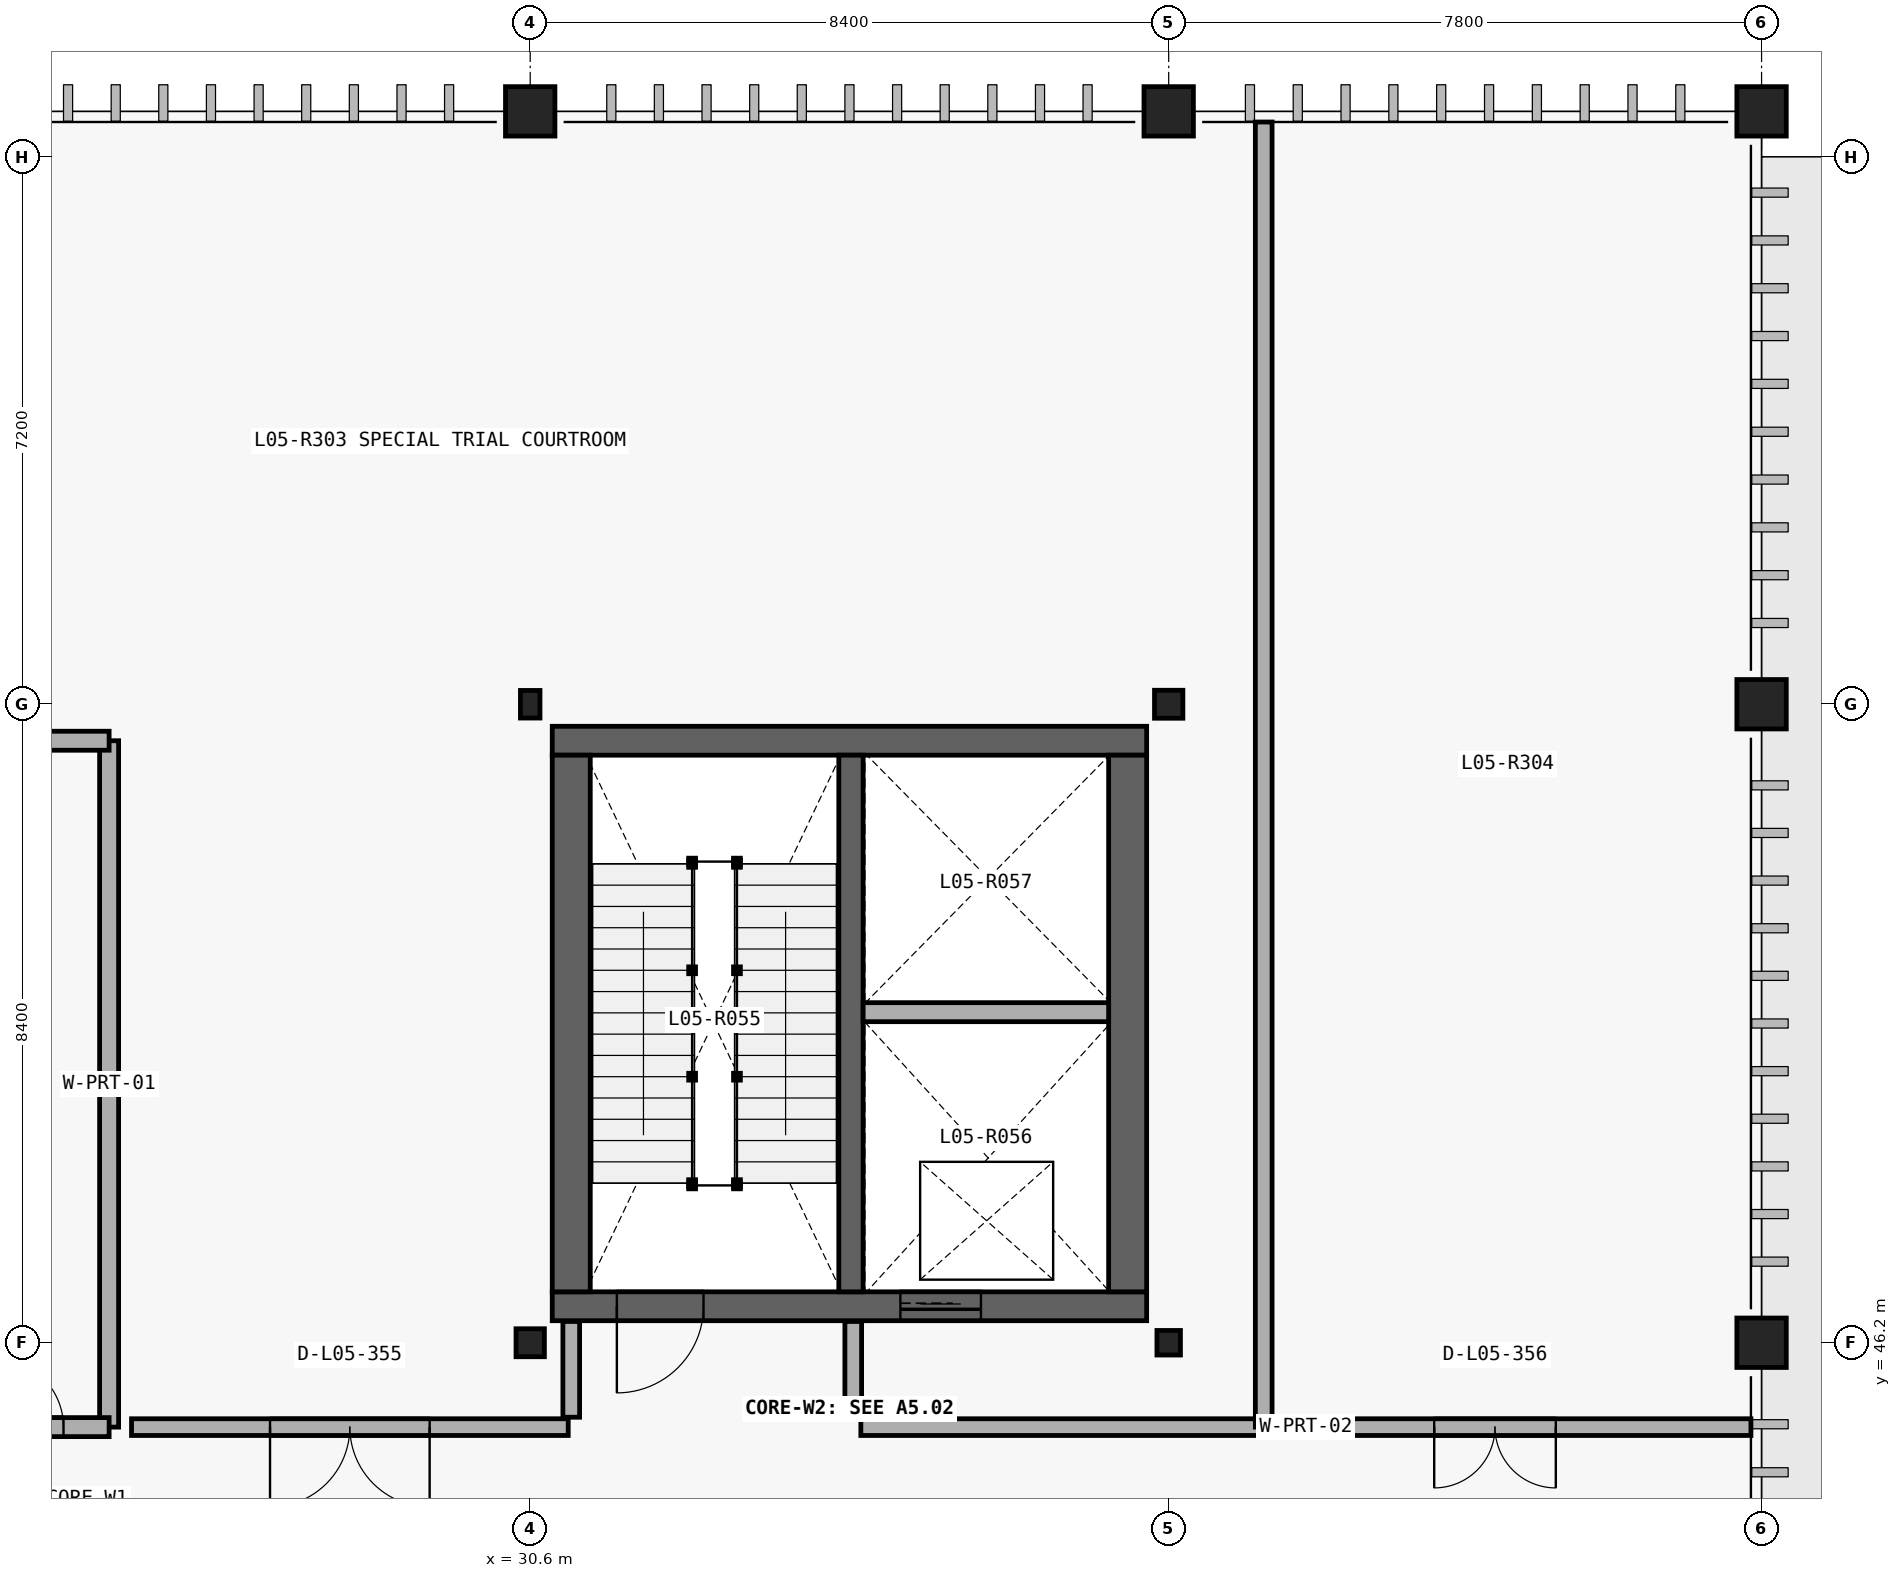
"""IFC4 building model, lengths in metres.
Left out: names, types, materials, properties, quantities, classifications, styles, units other than length and angle.
Written with IfcOpenShell. Run it as: python <this file> out.ifc"""

import sys

from ifc_helpers import new_model, si_unit, direction, frame, frame_2d, origin_with_axes, origin_2d_with_axis, place, context, subcontext, project, spatial, rectangle, circle, i_section, extrude, element, fill, save


model = new_model("IFC4")
c1 = context("Model", 3, precision=1e-05, world=origin_with_axes(), true_north=direction((0.0, 1.0)))
c2 = subcontext(c1, "Body", "Model", "MODEL_VIEW")
j1 = project(units=[si_unit("LENGTHUNIT", "METRE"), si_unit("PLANEANGLEUNIT", "RADIAN")], contexts=[c1])
p1 = place(None, origin_with_axes())
s1 = spatial("IfcSite", under=j1, at=p1, CompositionType="ELEMENT")
p2 = place(p1, origin_with_axes())
s2 = spatial("IfcBuilding", under=s1, at=p2, CompositionType="ELEMENT")
p3 = place(p2, frame((0.0, 0.0, 24.9), z_axis=(0.0, 0.0, 1.0), x_axis=(1.0, 0.0, 0.0)))
s3 = spatial("IfcBuildingStorey", under=s2, at=p3, CompositionType="ELEMENT", Elevation=24.9)
p4 = place(None, frame((25.06, 45.09, 24.9), z_axis=(0.0, 0.0, 1.0), x_axis=(0.0, 1.0, 0.0)))
e1 = element("IfcWall", 1, at=p4, inside=s3, PredefinedType="PARTITIONING", context=c2, shape_type="SweptSolid", body=[
    extrude(rectangle(XDim=9.03, YDim=0.25, at=frame_2d((4.515, 0.0), x_axis=(1.0, 0.0))), origin_with_axes(), (0.0, 0.0, 1.0), 4.44),
])
p5 = place(None, frame((21.7, 54.12, 24.9), z_axis=(0.0, 0.0, 1.0), x_axis=(1.0, 0.0, 0.0)))
e2 = element("IfcWall", 2, at=p5, inside=s3, PredefinedType="PARTITIONING", context=c2, shape_type="SweptSolid", body=[
    extrude(rectangle(XDim=3.36, YDim=0.25, at=frame_2d((1.68, 0.0), x_axis=(1.0, 0.0))), origin_with_axes(), (0.0, 0.0, 1.0), 4.44),
])
p6 = place(None, frame((21.7, 45.09, 24.9), z_axis=(0.0, 0.0, 1.0), x_axis=(1.0, 0.0, 0.0)))
e3 = element("IfcWall", 3, at=p6, inside=s3, PredefinedType="PARTITIONING", context=c2, shape_type="SweptSolid", body=[
    extrude(rectangle(XDim=3.36, YDim=0.25, at=frame_2d((1.68, 0.0), x_axis=(1.0, 0.0))), origin_with_axes(), (0.0, 0.0, 1.0), 4.44),
])
p7 = place(None, frame((24.005, 45.09, 24.9), z_axis=(0.0, 0.0, 1.0), x_axis=(1.0, 0.0, 0.0)))
e4 = element("IfcOpeningElement", 4, at=p7, cuts=e3, PredefinedType="OPENING", context=c2, shape_type="SweptSolid", body=[
    extrude(rectangle(XDim=0.91, YDim=2.12, at=frame_2d((0.0, 1.06), x_axis=(1.0, 0.0))), frame((0.0, 0.135, 0.0), z_axis=(0.0, -1.0, 0.0), x_axis=(1.0, 0.0, 0.0)), (0.0, 0.0, 1.0), 0.27),
])
p8 = place(None, frame((30.89, 46.68, 24.9), z_axis=(0.0, 0.0, 1.0), x_axis=(1.0, 0.0, 0.0)))
e5 = element("IfcWall", 5, at=p8, inside=s3, PredefinedType="SHEAR", context=c2, shape_type="SweptSolid", body=[
    extrude(rectangle(XDim=7.82, YDim=0.38, at=frame_2d((3.91, 0.0), x_axis=(1.0, 0.0))), origin_with_axes(), (0.0, 0.0, 1.0), 4.8),
])
p9 = place(None, frame((32.31, 46.68, 24.9), z_axis=(0.0, 0.0, 1.0), x_axis=(1.0, 0.0, 0.0)))
e6 = element("IfcOpeningElement", 6, at=p9, cuts=e5, PredefinedType="OPENING", context=c2, shape_type="SweptSolid", body=[
    extrude(rectangle(XDim=1.14, YDim=2.18, at=frame_2d((0.0, 1.09), x_axis=(1.0, 0.0))), frame((0.0, 0.2, 0.0), z_axis=(0.0, -1.0, 0.0), x_axis=(1.0, 0.0, 0.0)), (0.0, 0.0, 1.0), 0.4),
])
p10 = place(None, frame((36.0, 46.68, 24.9), z_axis=(0.0, 0.0, 1.0), x_axis=(1.0, 0.0, 0.0)))
e7 = element("IfcOpeningElement", 7, at=p10, cuts=e5, PredefinedType="OPENING", context=c2, shape_type="SweptSolid", body=[
    extrude(rectangle(XDim=1.06, YDim=2.16, at=frame_2d((0.0, 1.08), x_axis=(1.0, 0.0))), frame((0.0, 0.2, 0.0), z_axis=(0.0, -1.0, 0.0), x_axis=(1.0, 0.0, 0.0)), (0.0, 0.0, 1.0), 0.4),
])
p11 = place(None, frame((38.71, 54.12, 24.9), z_axis=(0.0, 0.0, 1.0), x_axis=(-1.0, 0.0, 0.0)))
e8 = element("IfcWall", 8, at=p11, inside=s3, PredefinedType="SHEAR", context=c2, shape_type="SweptSolid", body=[
    extrude(rectangle(XDim=7.82, YDim=0.38, at=frame_2d((3.91, 0.0), x_axis=(1.0, 0.0))), origin_with_axes(), (0.0, 0.0, 1.0), 4.8),
])
for number, where, z_axis, x_axis in (
    (9, (38.46, 46.87, 24.9), (0.0, 0.0, 1.0), (0.0, 1.0, 0.0)),
    (10, (31.14, 53.93, 24.9), (0.0, 0.0, 1.0), (0.0, -1.0, 0.0)),
):
    element("IfcWall", number, at=place(None, frame(where, z_axis=z_axis, x_axis=x_axis)), inside=s3, PredefinedType="SHEAR", context=c2, shape_type="SweptSolid", body=[
        extrude(rectangle(XDim=7.06, YDim=0.5, at=frame_2d((3.53, 0.0), x_axis=(1.0, 0.0))), origin_with_axes(), (0.0, 0.0, 1.0), 4.8),
    ])
p12 = place(None, frame((34.82, 46.87, 24.9), z_axis=(0.0, 0.0, 1.0), x_axis=(0.0, 1.0, 0.0)))
e11 = element("IfcWall", 11, at=p12, inside=s3, PredefinedType="SHEAR", context=c2, shape_type="SweptSolid", body=[
    extrude(rectangle(XDim=7.06, YDim=0.32, at=frame_2d((3.53, 0.0), x_axis=(1.0, 0.0))), origin_with_axes(), (0.0, 0.0, 1.0), 4.8),
])
p13 = place(None, frame((34.98, 50.549, 24.9), z_axis=(0.0, 0.0, 1.0), x_axis=(1.0, 0.0, 0.0)))
e12 = element("IfcWall", 12, at=p13, inside=s3, PredefinedType="PARTITIONING", context=c2, shape_type="SweptSolid", body=[
    extrude(rectangle(XDim=3.23, YDim=0.25, at=frame_2d((1.615, 0.0), x_axis=(1.0, 0.0))), origin_with_axes(), (0.0, 0.0, 1.0), 4.44),
])
for number, where, z_axis, x_axis in (
    (13, (31.14, 45.22, 24.9), (0.0, 0.0, 1.0), (0.0, 1.0, 0.0)),
    (14, (34.85, 45.22, 24.9), (0.0, 0.0, 1.0), (0.0, 1.0, 0.0)),
):
    element("IfcWall", number, at=place(None, frame(where, z_axis=z_axis, x_axis=x_axis)), inside=s3, PredefinedType="PARTITIONING", context=c2, shape_type="SweptSolid", body=[
        extrude(rectangle(XDim=1.26, YDim=0.22, at=frame_2d((0.63, 0.0), x_axis=(1.0, 0.0))), origin_with_axes(), (0.0, 0.0, 1.0), 4.44),
    ])
p14 = place(None, frame((25.355, 45.09, 24.9), z_axis=(0.0, 0.0, 1.0), x_axis=(1.0, 0.0, 0.0)))
e15 = element("IfcWall", 15, at=p14, inside=s3, PredefinedType="PARTITIONING", context=c2, shape_type="SweptSolid", body=[
    extrude(rectangle(XDim=5.745, YDim=0.22, at=frame_2d((2.873, 0.0), x_axis=(1.0, 0.0))), origin_with_axes(), (0.0, 0.0, 1.0), 4.44),
])
p15 = place(None, frame((28.227, 45.09, 24.9), z_axis=(0.0, 0.0, 1.0), x_axis=(1.0, 0.0, 0.0)))
e16 = element("IfcOpeningElement", 16, at=p15, cuts=e15, PredefinedType="OPENING", context=c2, shape_type="SweptSolid", body=[
    extrude(rectangle(XDim=2.1, YDim=2.8, at=frame_2d((0.0, 1.4), x_axis=(1.0, 0.0))), frame((0.0, 0.12, 0.0), z_axis=(0.0, -1.0, 0.0), x_axis=(1.0, 0.0, 0.0)), (0.0, 0.0, 1.0), 0.24),
])
p16 = place(None, frame((34.95, 45.09, 24.9), z_axis=(0.0, 0.0, 1.0), x_axis=(1.0, 0.0, 0.0)))
e17 = element("IfcWall", 17, at=p16, inside=s3, PredefinedType="PARTITIONING", context=c2, shape_type="SweptSolid", body=[
    extrude(rectangle(XDim=11.71, YDim=0.22, at=frame_2d((5.855, 0.0), x_axis=(1.0, 0.0))), origin_with_axes(), (0.0, 0.0, 1.0), 4.44),
])
p17 = place(None, frame((43.293, 45.09, 24.9), z_axis=(0.0, 0.0, 1.0), x_axis=(1.0, 0.0, 0.0)))
e18 = element("IfcOpeningElement", 18, at=p17, cuts=e17, PredefinedType="OPENING", context=c2, shape_type="SweptSolid", body=[
    extrude(rectangle(XDim=1.6, YDim=2.32, at=frame_2d((0.0, 1.16), x_axis=(1.0, 0.0))), frame((0.0, 0.12, 0.0), z_axis=(0.0, -1.0, 0.0), x_axis=(1.0, 0.0, 0.0)), (0.0, 0.0, 1.0), 0.24),
])
p18 = place(None, frame((40.25, 45.09, 24.9), z_axis=(0.0, 0.0, 1.0), x_axis=(0.0, 1.0, 0.0)))
e19 = element("IfcWall", 19, at=p18, inside=s3, PredefinedType="PARTITIONING", context=c2, shape_type="SweptSolid", body=[
    extrude(rectangle(XDim=17.17, YDim=0.22, at=frame_2d((8.585, 0.0), x_axis=(1.0, 0.0))), origin_with_axes(), (0.0, 0.0, 1.0), 4.44),
])
p19 = place(None, frame((30.6, 46.2, 24.9), z_axis=(0.0, 0.0, 1.0), x_axis=(1.0, 0.0, 0.0)))
e20 = element("IfcColumn", 20, at=p19, inside=s3, PredefinedType="COLUMN", context=c2, shape_type="SweptSolid", body=[
    extrude(i_section(OverallWidth=0.373, OverallDepth=0.368, WebThickness=0.015, FlangeThickness=0.024, at=origin_2d_with_axis()), origin_with_axes(), (0.0, 0.0, 1.0), 4.8),
])
p20 = place(None, frame((30.6, 54.6, 24.9), z_axis=(0.0, 0.0, 1.0), x_axis=(1.0, 0.0, 0.0)))
e21 = element("IfcColumn", 21, at=p20, inside=s3, PredefinedType="COLUMN", context=c2, shape_type="SweptSolid", body=[
    extrude(i_section(OverallWidth=0.257, OverallDepth=0.363, WebThickness=0.013, FlangeThickness=0.022, at=origin_2d_with_axis()), origin_with_axes(), (0.0, 0.0, 1.0), 4.8),
])
p21 = place(None, frame((30.6, 62.4, 24.9), z_axis=(0.0, 0.0, 1.0), x_axis=(1.0, 0.0, 0.0)))
e22 = element("IfcColumn", 22, at=p21, inside=s3, PredefinedType="COLUMN", context=c2, shape_type="SweptSolid", body=[
    extrude(circle(Radius=0.325, at=origin_2d_with_axis()), origin_with_axes(), (0.0, 0.0, 1.0), 4.8),
])
p22 = place(None, frame((39.0, 46.2, 24.9), z_axis=(0.0, 0.0, 1.0), x_axis=(1.0, 0.0, 0.0)))
e23 = element("IfcColumn", 23, at=p22, inside=s3, PredefinedType="COLUMN", context=c2, shape_type="SweptSolid", body=[
    extrude(i_section(OverallWidth=0.309, OverallDepth=0.323, WebThickness=0.014, FlangeThickness=0.023, at=origin_2d_with_axis()), origin_with_axes(), (0.0, 0.0, 1.0), 4.8),
])
p23 = place(None, frame((39.0, 54.6, 24.9), z_axis=(0.0, 0.0, 1.0), x_axis=(1.0, 0.0, 0.0)))
e24 = element("IfcColumn", 24, at=p23, inside=s3, PredefinedType="COLUMN", context=c2, shape_type="SweptSolid", body=[
    extrude(i_section(OverallWidth=0.373, OverallDepth=0.368, WebThickness=0.015, FlangeThickness=0.024, at=origin_2d_with_axis()), origin_with_axes(), (0.0, 0.0, 1.0), 4.8),
])
for number, where, z_axis, x_axis in (
    (25, (39.0, 62.4, 24.9), (0.0, 0.0, 1.0), (1.0, 0.0, 0.0)),
    (26, (46.8, 46.2, 24.9), (0.0, 0.0, 1.0), (1.0, 0.0, 0.0)),
    (27, (46.8, 54.6, 24.9), (0.0, 0.0, 1.0), (1.0, 0.0, 0.0)),
    (28, (46.8, 62.4, 24.9), (0.0, 0.0, 1.0), (1.0, 0.0, 0.0)),
):
    element("IfcColumn", number, at=place(None, frame(where, z_axis=z_axis, x_axis=x_axis)), inside=s3, PredefinedType="COLUMN", context=c2, shape_type="SweptSolid", body=[
        extrude(circle(Radius=0.325, at=origin_2d_with_axis()), origin_with_axes(), (0.0, 0.0, 1.0), 4.8),
    ])
p24 = place(None, frame((24.005, 45.09, 24.9), z_axis=(0.0, 0.0, 1.0), x_axis=(1.0, 0.0, 0.0)))
e29 = element("IfcDoor", 29, at=p24, inside=s3, OperationType="SINGLE_SWING_LEFT", PredefinedType="DOOR", context=c2, shape_type="SweptSolid", body=[
    extrude(rectangle(XDim=0.91, YDim=2.12, at=frame_2d((0.0, 1.06), x_axis=(1.0, 0.0))), frame((0.0, 0.04, 0.0), z_axis=(0.0, -1.0, 0.0), x_axis=(1.0, 0.0, 0.0)), (0.0, 0.0, 1.0), 0.08),
])
fill(e4, e29)
p25 = place(None, frame((32.31, 46.68, 24.9), z_axis=(0.0, 0.0, 1.0), x_axis=(-1.0, 0.0, 0.0)))
e30 = element("IfcDoor", 30, at=p25, inside=s3, OperationType="SINGLE_SWING_LEFT", PredefinedType="DOOR", context=c2, shape_type="SweptSolid", body=[
    extrude(rectangle(XDim=1.14, YDim=2.18, at=frame_2d((0.0, 1.09), x_axis=(1.0, 0.0))), frame((0.0, 0.04, 0.0), z_axis=(0.0, -1.0, 0.0), x_axis=(1.0, 0.0, 0.0)), (0.0, 0.0, 1.0), 0.08),
])
fill(e6, e30)
p26 = place(None, frame((36.0, 46.68, 24.9), z_axis=(0.0, 0.0, 1.0), x_axis=(-1.0, 0.0, 0.0)))
e31 = element("IfcDoor", 31, at=p26, inside=s3, OperationType="SLIDING_TO_LEFT", PredefinedType="DOOR", context=c2, shape_type="SweptSolid", body=[
    extrude(rectangle(XDim=1.06, YDim=2.16, at=frame_2d((0.0, 1.08), x_axis=(1.0, 0.0))), frame((0.0, 0.04, 0.0), z_axis=(0.0, -1.0, 0.0), x_axis=(1.0, 0.0, 0.0)), (0.0, 0.0, 1.0), 0.08),
])
fill(e7, e31)
p27 = place(None, frame((28.227, 45.09, 24.9), z_axis=(0.0, 0.0, 1.0), x_axis=(-1.0, 0.0, 0.0)))
e32 = element("IfcDoor", 32, at=p27, inside=s3, OperationType="DOUBLE_DOOR_SINGLE_SWING", PredefinedType="DOOR", context=c2, shape_type="SweptSolid", body=[
    extrude(rectangle(XDim=2.1, YDim=2.8, at=frame_2d((0.0, 1.4), x_axis=(1.0, 0.0))), frame((0.0, 0.04, 0.0), z_axis=(0.0, -1.0, 0.0), x_axis=(1.0, 0.0, 0.0)), (0.0, 0.0, 1.0), 0.08),
])
fill(e16, e32)
p28 = place(None, frame((43.293, 45.09, 24.9), z_axis=(0.0, 0.0, 1.0), x_axis=(-1.0, 0.0, 0.0)))
e33 = element("IfcDoor", 33, at=p28, inside=s3, OperationType="DOUBLE_DOOR_SINGLE_SWING", PredefinedType="DOOR", context=c2, shape_type="SweptSolid", body=[
    extrude(rectangle(XDim=1.6, YDim=2.32, at=frame_2d((0.0, 1.16), x_axis=(1.0, 0.0))), frame((0.0, 0.04, 0.0), z_axis=(0.0, -1.0, 0.0), x_axis=(1.0, 0.0, 0.0)), (0.0, 0.0, 1.0), 0.08),
])
fill(e18, e33)
save(model, sys.argv[1])
